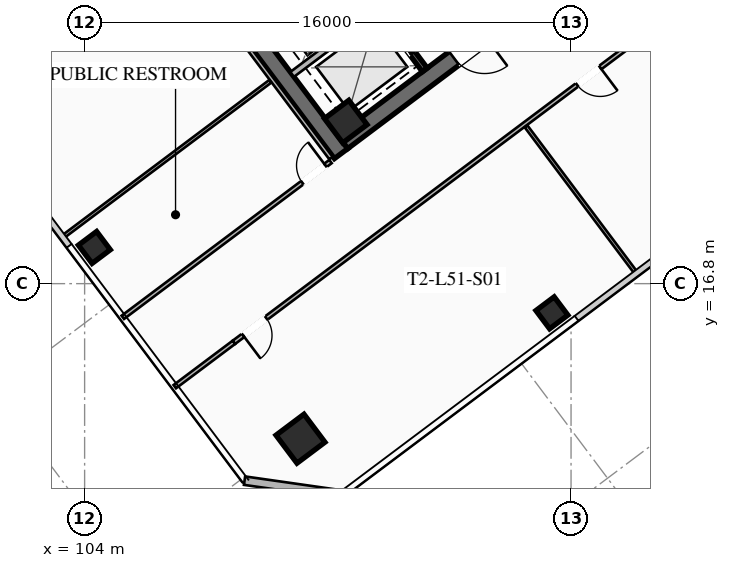
"""IFC4 building model, lengths in metres.
Left out: names, types, materials, properties, quantities, classifications, styles, units other than length and angle.
Written with IfcOpenShell. Run it as: python <this file> out.ifc"""

import sys

from ifc_helpers import new_model, si_unit, direction, frame, frame_2d, origin, origin_2d, place, context, subcontext, project, spatial, rectangle, hollow_rectangle, extrude, element, fill, save


model = new_model("IFC4")
c1 = context("Model", 3, precision=1e-05, world=origin(), true_north=direction((0.0, 1.0)))
c2 = subcontext(c1, "Body", "Model", "MODEL_VIEW")
j1 = project(units=[si_unit("LENGTHUNIT", "METRE"), si_unit("PLANEANGLEUNIT", "RADIAN")], contexts=[c1])
p1 = place(None, origin())
s1 = spatial("IfcSite", under=j1, at=p1, CompositionType="ELEMENT")
p2 = place(p1, origin())
s2 = spatial("IfcBuilding", under=s1, at=p2, CompositionType="ELEMENT")
p3 = place(p2, frame((0.0, 0.0, 188.95)))
s3 = spatial("IfcBuildingStorey", under=s2, at=p3, CompositionType="ELEMENT", Elevation=188.95)
p4 = place(p3, frame((112.436, 21.077, 0.0), z_axis=(0.0, 0.0, 1.0), x_axis=(-0.600005007985, 0.799996243986, 0.0)))
e1 = element("IfcWall", 1, at=p4, inside=s3, PredefinedType="SHEAR", context=c2, shape_type="SweptSolid", body=[
    extrude(rectangle(XDim=15.6, YDim=0.55, at=frame_2d((7.8, 0.0))), origin(), (0.0, 0.0, 1.0), 3.55),
])
p5 = place(p3, frame((124.539, 30.498, 0.0), z_axis=(0.0, 0.0, 1.0), x_axis=(-0.799998054672, -0.600002593761, 0.0)))
e2 = element("IfcWall", 2, at=p5, inside=s3, PredefinedType="SHEAR", context=c2, shape_type="SweptSolid", body=[
    extrude(rectangle(XDim=15.06, YDim=0.55, at=frame_2d((7.53, 0.0))), origin(), (0.0, 0.0, 1.0), 3.55),
])
p6 = place(p5, frame((9.23, 0.0, 0.0)))
e3 = element("IfcOpeningElement", 3, at=p6, cuts=e2, PredefinedType="OPENING", context=c2, shape_type="SweptSolid", body=[
    extrude(rectangle(XDim=1.25, YDim=2.25, at=frame_2d((0.625, 1.125))), frame((0.0, 0.285, 0.0), z_axis=(0.0, -1.0, 0.0), x_axis=(1.0, 0.0, 0.0)), (0.0, 0.0, 1.0), 0.57),
])
p7 = place(p5, frame((4.18, 0.0, 0.0)))
e4 = element("IfcOpeningElement", 4, at=p7, cuts=e2, PredefinedType="OPENING", context=c2, shape_type="SweptSolid", body=[
    extrude(rectangle(XDim=1.25, YDim=2.25, at=frame_2d((0.625, 1.125))), frame((0.0, 0.285, 0.0), z_axis=(0.0, -1.0, 0.0), x_axis=(1.0, 0.0, 0.0)), (0.0, 0.0, 1.0), 0.57),
])
p8 = place(p3, frame((112.59, 22.13, 0.0), z_axis=(0.0, 0.0, 1.0), x_axis=(0.799999996291, 0.600000004945, 0.0)))
e5 = element("IfcColumn", 5, at=p8, inside=s3, PredefinedType="COLUMN", context=c2, shape_type="SweptSolid", body=[
    extrude(hollow_rectangle(XDim=1.0, YDim=1.0, WallThickness=0.04, at=origin_2d()), origin(), (0.0, 0.0, 1.0), 3.37),
])
p9 = place(p3, frame((111.1, 11.7, 0.0), z_axis=(0.0, 0.0, 1.0), x_axis=(0.799999996291, 0.600000004945, 0.0)))
e6 = element("IfcColumn", 6, at=p9, inside=s3, PredefinedType="COLUMN", context=c2, shape_type="SweptSolid", body=[
    extrude(hollow_rectangle(XDim=1.15, YDim=1.15, WallThickness=0.045, at=origin_2d()), origin(), (0.0, 0.0, 1.0), 3.37),
])
for number, where, z_axis, x_axis in (
    (7, (119.37, 15.84, 0.0), (0.0, 0.0, 1.0), (0.8, 0.6, 0.0)),
    (8, (104.32, 17.99, 0.0), (0.0, 0.0, 1.0), (0.8, 0.6, 0.0)),
):
    element("IfcColumn", number, at=place(p3, frame(where, z_axis=z_axis, x_axis=x_axis)), inside=s3, PredefinedType="COLUMN", context=c2, shape_type="SweptSolid", body=[
        extrude(hollow_rectangle(XDim=0.75, YDim=0.75, WallThickness=0.032, at=origin_2d()), origin(), (0.0, 0.0, 1.0), 3.37),
    ])
p10 = place(p3, frame((112.48, 9.86, 0.0), z_axis=(0.0, 0.0, 1.0), x_axis=(-0.989950994782, 0.141410847992, 0.0)))
e9 = element("IfcWall", 9, at=p10, inside=s3, PredefinedType="SOLIDWALL", context=c2, shape_type="SweptSolid", body=[
    extrude(rectangle(XDim=3.253, YDim=0.28, at=frame_2d((1.626, 0.0))), origin(), (0.0, 0.0, 1.0), 3.37),
])
p11 = place(p3, frame((115.19, 23.83, 0.0), z_axis=(0.0, 0.0, 1.0), x_axis=(-0.599993943644, 0.800004542231, 0.0)))
e10 = element("IfcWall", 10, at=p11, inside=s3, PredefinedType="SHEAR", context=c2, shape_type="SweptSolid", body=[
    extrude(rectangle(XDim=6.45, YDim=0.2, at=frame_2d((3.225, 0.0))), origin(), (0.0, 0.0, 1.0), 3.37),
])
p12 = place(p11, frame((4.875, 0.0, 0.0)))
e11 = element("IfcOpeningElement", 11, at=p12, cuts=e10, PredefinedType="OPENING", context=c2, shape_type="SweptSolid", body=[
    extrude(rectangle(XDim=1.3, YDim=2.25, at=frame_2d((0.65, 1.125))), frame((0.0, 0.11, 0.0), z_axis=(0.0, -1.0, 0.0), x_axis=(1.0, 0.0, 0.0)), (0.0, 0.0, 1.0), 0.22),
])
p13 = place(p11, frame((2.875, 0.0, 0.0)))
e12 = element("IfcOpeningElement", 12, at=p13, cuts=e10, PredefinedType="OPENING", context=c2, shape_type="SweptSolid", body=[
    extrude(rectangle(XDim=1.3, YDim=2.25, at=frame_2d((0.65, 1.125))), frame((0.0, 0.11, 0.0), z_axis=(0.0, -1.0, 0.0), x_axis=(1.0, 0.0, 0.0)), (0.0, 0.0, 1.0), 0.22),
])
p14 = place(p11, frame((0.675, 0.0, 0.0)))
e13 = element("IfcOpeningElement", 13, at=p14, cuts=e10, PredefinedType="OPENING", context=c2, shape_type="SweptSolid", body=[
    extrude(rectangle(XDim=1.3, YDim=2.25, at=frame_2d((0.65, 1.125))), frame((0.0, 0.11, 0.0), z_axis=(0.0, -1.0, 0.0), x_axis=(1.0, 0.0, 0.0)), (0.0, 0.0, 1.0), 0.22),
])
p15 = place(p3, frame((110.826, 23.682, 0.0), z_axis=(0.0, 0.0, 1.0), x_axis=(0.8, 0.6, 0.0)))
e14 = element("IfcWall", 14, at=p15, inside=s3, PredefinedType="SOLIDWALL", context=c2, shape_type="SweptSolid", body=[
    extrude(rectangle(XDim=3.48, YDim=0.2, at=frame_2d((1.74, 0.0))), origin(), (0.0, 0.0, 1.0), 3.37),
])
p16 = place(p3, frame((131.87, 32.09, 0.0), z_axis=(0.0, 0.0, 1.0), x_axis=(-0.800003062365, -0.599995916825, 0.0)))
e15 = element("IfcWall", 15, at=p16, inside=s3, PredefinedType="PARTITIONING", context=c2, shape_type="SweptSolid", body=[
    extrude(rectangle(XDim=28.7, YDim=0.135, at=frame_2d((14.35, 0.0))), origin(), (0.0, 0.0, 1.0), 2.723),
])
p17 = place(p16, frame((27.37, 0.0, 0.0)))
e16 = element("IfcOpeningElement", 16, at=p17, cuts=e15, PredefinedType="OPENING", context=c2, shape_type="SweptSolid", body=[
    extrude(rectangle(XDim=0.95, YDim=2.05, at=frame_2d((0.475, 1.025))), frame((0.0, 0.077, 0.0), z_axis=(0.0, -1.0, 0.0), x_axis=(1.0, 0.0, 0.0)), (0.0, 0.0, 1.0), 0.155),
])
p18 = place(p16, frame((13.638, 0.0, 0.0)))
e17 = element("IfcOpeningElement", 17, at=p18, cuts=e15, PredefinedType="OPENING", context=c2, shape_type="SweptSolid", body=[
    extrude(rectangle(XDim=0.95, YDim=2.05, at=frame_2d((0.475, 1.025))), frame((0.0, 0.077, 0.0), z_axis=(0.0, -1.0, 0.0), x_axis=(1.0, 0.0, 0.0)), (0.0, 0.0, 1.0), 0.155),
])
p19 = place(p16, frame((0.38, 0.0, 0.0)))
e18 = element("IfcOpeningElement", 18, at=p19, cuts=e15, PredefinedType="OPENING", context=c2, shape_type="SweptSolid", body=[
    extrude(rectangle(XDim=0.95, YDim=2.05, at=frame_2d((0.475, 1.025))), frame((0.0, 0.077, 0.0), z_axis=(0.0, -1.0, 0.0), x_axis=(1.0, 0.0, 0.0)), (0.0, 0.0, 1.0), 0.155),
])
p20 = place(p3, frame((106.966, 13.412, 0.0), z_axis=(0.0, 0.0, 1.0), x_axis=(0.799975885537, 0.600032151272, 0.0)))
e19 = element("IfcWall", 19, at=p20, inside=s3, PredefinedType="PARTITIONING", context=c2, shape_type="SweptSolid", body=[
    extrude(rectangle(XDim=2.43, YDim=0.135, at=frame_2d((1.215, 0.0))), origin(), (0.0, 0.0, 1.0), 2.723),
])
p21 = place(p3, frame((122.148, 17.136, 0.0), z_axis=(0.0, 0.0, 1.0), x_axis=(-0.599980629989, 0.800014527142, 0.0)))
e20 = element("IfcWall", 20, at=p21, inside=s3, PredefinedType="PARTITIONING", context=c2, shape_type="SweptSolid", body=[
    extrude(rectangle(XDim=6.05, YDim=0.11, at=frame_2d((3.025, 0.0))), origin(), (0.0, 0.0, 1.0), 2.723),
])
p22 = place(p3, frame((112.104, 20.928, 0.0), z_axis=(0.0, 0.0, 1.0), x_axis=(-0.599994940075, 0.800003794918, 0.0)))
e21 = element("IfcWall", 21, at=p22, inside=s3, PredefinedType="PARTITIONING", context=c2, shape_type="SweptSolid", body=[
    extrude(rectangle(XDim=15.44, YDim=0.135, at=frame_2d((7.72, 0.0))), origin(), (0.0, 0.0, 1.0), 2.723),
])
p23 = place(p3, frame((105.256, 15.692, 0.0), z_axis=(0.0, 0.0, 1.0), x_axis=(0.799989708052, 0.600013722352, 0.0)))
e22 = element("IfcWall", 22, at=p23, inside=s3, PredefinedType="PARTITIONING", context=c2, shape_type="SweptSolid", body=[
    extrude(rectangle(XDim=8.54, YDim=0.135, at=frame_2d((4.27, 0.0))), origin(), (0.0, 0.0, 1.0), 2.723),
])
p24 = place(p23, frame((7.38, 0.0, 0.0)))
e23 = element("IfcOpeningElement", 23, at=p24, cuts=e22, PredefinedType="OPENING", context=c2, shape_type="SweptSolid", body=[
    extrude(rectangle(XDim=0.95, YDim=2.05, at=frame_2d((0.475, 1.025))), frame((0.0, 0.077, 0.0), z_axis=(0.0, -1.0, 0.0), x_axis=(1.0, 0.0, 0.0)), (0.0, 0.0, 1.0), 0.155),
])
p25 = place(p3, frame((103.276, 18.332, 0.0), z_axis=(0.0, 0.0, 1.0), x_axis=(0.8, 0.6, 0.0)))
e24 = element("IfcWall", 24, at=p25, inside=s3, PredefinedType="PARTITIONING", context=c2, shape_type="SweptSolid", body=[
    extrude(rectangle(XDim=8.54, YDim=0.11, at=frame_2d((4.27, 0.0))), origin(), (0.0, 0.0, 1.0), 2.723),
])
p26 = place(p6, origin())
e25 = element("IfcDoor", 25, at=p26, inside=s3, OperationType="SINGLE_SWING_LEFT", PredefinedType="DOOR", context=c2, shape_type="SweptSolid", body=[
    extrude(rectangle(XDim=1.25, YDim=2.25, at=frame_2d((0.625, 1.125))), frame((0.0, 0.025, 0.0), z_axis=(0.0, -1.0, 0.0), x_axis=(1.0, 0.0, 0.0)), (0.0, 0.0, 1.0), 0.05),
])
fill(e3, e25)
p27 = place(p17, origin())
e26 = element("IfcDoor", 26, at=p27, inside=s3, OperationType="SINGLE_SWING_RIGHT", PredefinedType="DOOR", context=c2, shape_type="SweptSolid", body=[
    extrude(rectangle(XDim=0.95, YDim=2.05, at=frame_2d((0.475, 1.025))), frame((0.0, 0.025, 0.0), z_axis=(0.0, -1.0, 0.0), x_axis=(1.0, 0.0, 0.0)), (0.0, 0.0, 1.0), 0.05),
])
fill(e16, e26)
p28 = place(p18, origin())
e27 = element("IfcDoor", 27, at=p28, inside=s3, OperationType="SINGLE_SWING_LEFT", PredefinedType="DOOR", context=c2, shape_type="SweptSolid", body=[
    extrude(rectangle(XDim=0.95, YDim=2.05, at=frame_2d((0.475, 1.025))), frame((0.0, 0.025, 0.0), z_axis=(0.0, -1.0, 0.0), x_axis=(1.0, 0.0, 0.0)), (0.0, 0.0, 1.0), 0.05),
])
fill(e17, e27)
p29 = place(p24, origin())
e28 = element("IfcDoor", 28, at=p29, inside=s3, OperationType="SINGLE_SWING_RIGHT", PredefinedType="DOOR", context=c2, shape_type="SweptSolid", body=[
    extrude(rectangle(XDim=0.95, YDim=2.05, at=frame_2d((0.475, 1.025))), frame((0.0, 0.025, 0.0), z_axis=(0.0, -1.0, 0.0), x_axis=(1.0, 0.0, 0.0)), (0.0, 0.0, 1.0), 0.05),
])
fill(e23, e28)
p30 = place(p14, origin())
e29 = element("IfcDoor", 29, at=p30, inside=s3, OperationType="SLIDING_TO_LEFT", PredefinedType="DOOR", context=c2, shape_type="SweptSolid", body=[
    extrude(rectangle(XDim=1.3, YDim=2.25, at=frame_2d((0.65, 1.125))), frame((0.0, 0.025, 0.0), z_axis=(0.0, -1.0, 0.0), x_axis=(1.0, 0.0, 0.0)), (0.0, 0.0, 1.0), 0.05),
])
fill(e13, e29)
save(model, sys.argv[1])
